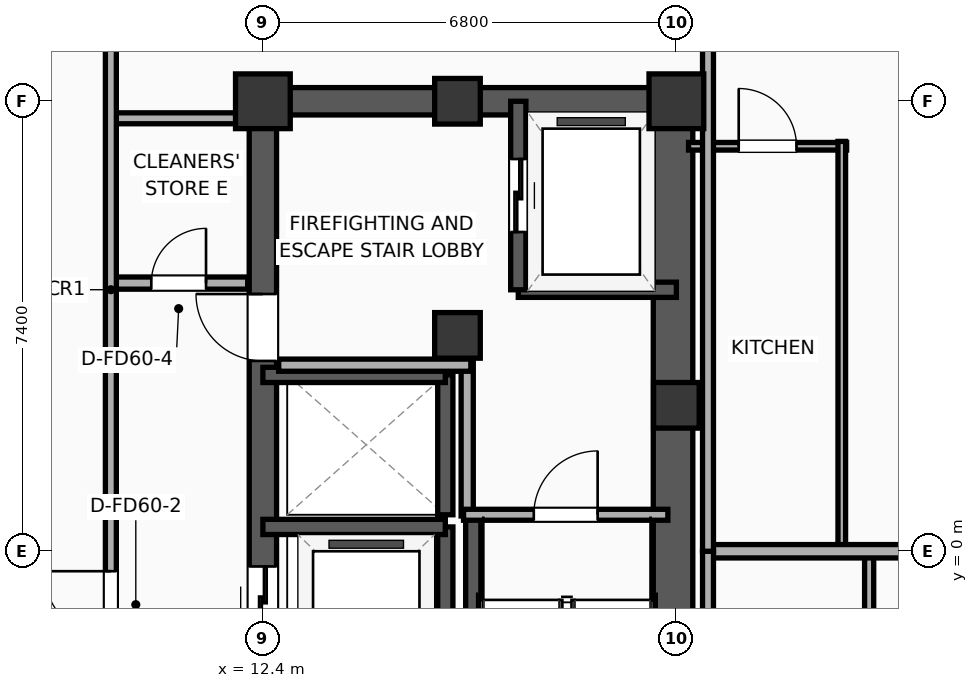
"""IFC4 building model, lengths in metres.
Left out: names, types, materials, properties, quantities, classifications, styles, units other than length and angle.
Written with IfcOpenShell. Run it as: python <this file> out.ifc"""

import sys

from ifc_helpers import new_model, si_unit, direction, frame, frame_2d, origin, origin_2d, place, context, subcontext, project, spatial, rectangle, extrude, element, fill, save


model = new_model("IFC4")
c1 = context("Model", 3, precision=1e-05, world=origin(), true_north=direction((0.0, 1.0)))
c2 = subcontext(c1, "Body", "Model", "MODEL_VIEW")
j1 = project(units=[si_unit("LENGTHUNIT", "METRE"), si_unit("PLANEANGLEUNIT", "RADIAN")], contexts=[c1])
p1 = place(None, origin())
s1 = spatial("IfcSite", under=j1, at=p1, CompositionType="ELEMENT")
p2 = place(p1, origin())
s2 = spatial("IfcBuilding", under=s1, at=p2, CompositionType="ELEMENT")
p3 = place(p2, frame((0.0, 0.0, 187.2)))
s3 = spatial("IfcBuildingStorey", under=s2, at=p3, CompositionType="ELEMENT", Elevation=187.2)
p4 = place(p3, frame((15.6, 3.55, 0.0), z_axis=(0.0, 0.0, 1.0), x_axis=(1.0, 0.0, 0.0)))
e1 = element("IfcColumn", 1, at=p4, inside=s3, PredefinedType="COLUMN", context=c2, shape_type="SweptSolid", body=[
    extrude(rectangle(XDim=0.75, YDim=0.75, at=origin_2d()), origin(), (0.0, 0.0, 1.0), 3.9),
])
p5 = place(p3, frame((12.4, 7.4, 0.0), z_axis=(0.0, 0.0, 1.0), x_axis=(1.0, 0.0, 0.0)))
e2 = element("IfcColumn", 2, at=p5, inside=s3, PredefinedType="COLUMN", context=c2, shape_type="SweptSolid", body=[
    extrude(rectangle(XDim=0.9, YDim=0.9, at=origin_2d()), origin(), (0.0, 0.0, 1.0), 3.9),
])
for number, where, z_axis, x_axis in (
    (3, (15.6, 7.4, 0.0), (0.0, 0.0, 1.0), (1.0, 0.0, 0.0)),
    (4, (19.2, 2.4, 0.0), (0.0, 0.0, 1.0), (1.0, 0.0, 0.0)),
):
    element("IfcColumn", number, at=place(p3, frame(where, z_axis=z_axis, x_axis=x_axis)), inside=s3, PredefinedType="COLUMN", context=c2, shape_type="SweptSolid", body=[
        extrude(rectangle(XDim=0.75, YDim=0.75, at=origin_2d()), origin(), (0.0, 0.0, 1.0), 3.9),
    ])
p6 = place(p3, frame((19.2, 7.4, 0.0), z_axis=(0.0, 0.0, 1.0), x_axis=(1.0, 0.0, 0.0)))
e5 = element("IfcColumn", 5, at=p6, inside=s3, PredefinedType="COLUMN", context=c2, shape_type="SweptSolid", body=[
    extrude(rectangle(XDim=0.9, YDim=0.9, at=origin_2d()), origin(), (0.0, 0.0, 1.0), 3.9),
])
p7 = place(p3, frame((12.175, 7.4, 0.0), z_axis=(0.0, 0.0, 1.0), x_axis=(1.0, 0.0, 0.0)))
e6 = element("IfcWall", 6, at=p7, inside=s3, PredefinedType="SHEAR", context=c2, shape_type="SweptSolid", body=[
    extrude(rectangle(XDim=7.25, YDim=0.45, at=frame_2d((3.625, 0.0))), origin(), (0.0, 0.0, 1.0), 3.65),
])
p8 = place(p3, frame((12.4, -7.4, 0.0), z_axis=(0.0, 0.0, 1.0), x_axis=(0.0, 1.0, 0.0)))
e7 = element("IfcWall", 7, at=p8, inside=s3, PredefinedType="SHEAR", context=c2, shape_type="SweptSolid", body=[
    extrude(rectangle(XDim=14.8, YDim=0.45, at=frame_2d((7.4, 0.0))), origin(), (0.0, 0.0, 1.0), 3.65),
])
p9 = place(p8, frame((3.45, 0.0, 0.0)))
e8 = element("IfcOpeningElement", 8, at=p9, cuts=e7, PredefinedType="OPENING", context=c2, shape_type="SweptSolid", body=[
    extrude(rectangle(XDim=1.1, YDim=2.05, at=frame_2d((0.55, 1.025))), frame((0.0, 0.235, 0.0), z_axis=(0.0, -1.0, 0.0), x_axis=(1.0, 0.0, 0.0)), (0.0, 0.0, 1.0), 0.47),
])
p10 = place(p8, frame((6.05, 0.0, 0.0)))
e9 = element("IfcOpeningElement", 9, at=p10, cuts=e7, PredefinedType="OPENING", context=c2, shape_type="SweptSolid", body=[
    extrude(rectangle(XDim=1.1, YDim=2.05, at=frame_2d((0.55, 1.025))), frame((0.0, 0.235, 0.0), z_axis=(0.0, -1.0, 0.0), x_axis=(1.0, 0.0, 0.0)), (0.0, 0.0, 1.0), 0.47),
])
p11 = place(p8, frame((10.53, 0.0, 0.0)))
e10 = element("IfcOpeningElement", 10, at=p11, cuts=e7, PredefinedType="OPENING", context=c2, shape_type="SweptSolid", body=[
    extrude(rectangle(XDim=1.1, YDim=2.05, at=frame_2d((0.55, 1.025))), frame((0.0, 0.235, 0.0), z_axis=(0.0, -1.0, 0.0), x_axis=(1.0, 0.0, 0.0)), (0.0, 0.0, 1.0), 0.47),
])
p12 = place(p8, frame((1.0, 0.0, 0.0)))
e11 = element("IfcOpeningElement", 11, at=p12, cuts=e7, PredefinedType="OPENING", context=c2, shape_type="SweptSolid", body=[
    extrude(rectangle(XDim=0.9, YDim=2.05, at=frame_2d((0.45, 1.025))), frame((0.0, 0.235, 0.0), z_axis=(0.0, -1.0, 0.0), x_axis=(1.0, 0.0, 0.0)), (0.0, 0.0, 1.0), 0.47),
])
p13 = place(p3, frame((19.145, -7.4, 0.0), z_axis=(0.0, 0.0, 1.0), x_axis=(0.0, 1.0, 0.0)))
e12 = element("IfcWall", 12, at=p13, inside=s3, PredefinedType="SHEAR", context=c2, shape_type="SweptSolid", body=[
    extrude(rectangle(XDim=14.8, YDim=0.65, at=frame_2d((7.4, 0.0))), origin(), (0.0, 0.0, 1.0), 3.65),
])
p14 = place(p3, frame((15.86, -7.085, 0.0), z_axis=(0.0, 0.0, 1.0), x_axis=(0.0, 1.0, 0.0)))
e13 = element("IfcWall", 13, at=p14, inside=s3, PredefinedType="SOLIDWALL", context=c2, shape_type="SweptSolid", body=[
    extrude(rectangle(XDim=7.685, YDim=0.25, at=frame_2d((3.843, 0.0))), origin(), (0.0, 0.0, 1.0), 3.65),
])
p15 = place(p3, frame((16.6, 4.3, 0.0), z_axis=(0.0, 0.0, 1.0), x_axis=(1.0, 0.0, 0.0)))
e14 = element("IfcWall", 14, at=p15, inside=s3, PredefinedType="SOLIDWALL", context=c2, shape_type="SweptSolid", body=[
    extrude(rectangle(XDim=2.6, YDim=0.25, at=frame_2d((1.3, 0.0))), origin(), (0.0, 0.0, 1.0), 3.65),
])
p16 = place(p3, frame((16.6, 7.4, 0.0), z_axis=(0.0, 0.0, 1.0), x_axis=(0.0, -1.0, 0.0)))
e15 = element("IfcWall", 15, at=p16, inside=s3, PredefinedType="SOLIDWALL", context=c2, shape_type="SweptSolid", body=[
    extrude(rectangle(XDim=3.1, YDim=0.25, at=frame_2d((1.55, 0.0))), origin(), (0.0, 0.0, 1.0), 3.65),
])
p17 = place(p16, frame((0.95, 0.0, 0.0)))
e16 = element("IfcOpeningElement", 16, at=p17, cuts=e15, PredefinedType="OPENING", context=c2, shape_type="SweptSolid", body=[
    extrude(rectangle(XDim=1.2, YDim=2.05, at=frame_2d((0.6, 1.025))), frame((0.0, 0.135, 0.0), z_axis=(0.0, -1.0, 0.0), x_axis=(1.0, 0.0, 0.0)), (0.0, 0.0, 1.0), 0.27),
])
p18 = place(p3, frame((15.4, -2.0, 0.0), z_axis=(0.0, 0.0, 1.0), x_axis=(0.0, 1.0, 0.0)))
e17 = element("IfcWall", 17, at=p18, inside=s3, PredefinedType="SOLIDWALL", context=c2, shape_type="SweptSolid", body=[
    extrude(rectangle(XDim=2.4, YDim=0.25, at=frame_2d((1.2, 0.0))), origin(), (0.0, 0.0, 1.0), 3.65),
])
p19 = place(p3, frame((15.4, 0.4, 0.0), z_axis=(0.0, 0.0, 1.0), x_axis=(-1.0, 0.0, 0.0)))
e18 = element("IfcWall", 18, at=p19, inside=s3, PredefinedType="SOLIDWALL", context=c2, shape_type="SweptSolid", body=[
    extrude(rectangle(XDim=3.0, YDim=0.25, at=frame_2d((1.5, 0.0))), origin(), (0.0, 0.0, 1.0), 3.65),
])
p20 = place(p3, frame((15.4, 0.6, 0.0), z_axis=(0.0, 0.0, 1.0), x_axis=(0.0, 1.0, 0.0)))
e19 = element("IfcWall", 19, at=p20, inside=s3, PredefinedType="SOLIDWALL", context=c2, shape_type="SweptSolid", body=[
    extrude(rectangle(XDim=2.3, YDim=0.25, at=frame_2d((1.15, 0.0))), origin(), (0.0, 0.0, 1.0), 3.65),
])
p21 = place(p3, frame((15.4, 2.9, 0.0), z_axis=(0.0, 0.0, 1.0), x_axis=(-1.0, 0.0, 0.0)))
e20 = element("IfcWall", 20, at=p21, inside=s3, PredefinedType="SOLIDWALL", context=c2, shape_type="SweptSolid", body=[
    extrude(rectangle(XDim=3.0, YDim=0.25, at=frame_2d((1.5, 0.0))), origin(), (0.0, 0.0, 1.0), 3.65),
])
p22 = place(p3, frame((15.76, 0.58, 0.0), z_axis=(0.0, 0.0, 1.0), x_axis=(0.0, 1.0, 0.0)))
e21 = element("IfcWall", 21, at=p22, inside=s3, PredefinedType="PARTITIONING", context=c2, shape_type="SweptSolid", body=[
    extrude(rectangle(XDim=2.52, YDim=0.2, at=frame_2d((1.26, 0.0))), origin(), (0.0, 0.0, 1.0), 3.65),
])
p23 = place(p3, frame((12.66, 3.06, 0.0), z_axis=(0.0, 0.0, 1.0), x_axis=(1.0, 0.0, 0.0)))
e22 = element("IfcWall", 22, at=p23, inside=s3, PredefinedType="PARTITIONING", context=c2, shape_type="SweptSolid", body=[
    extrude(rectangle(XDim=3.16, YDim=0.2, at=frame_2d((1.58, 0.0))), origin(), (0.0, 0.0, 1.0), 3.65),
])
p24 = place(p3, frame((15.7, 0.6, 0.0), z_axis=(0.0, 0.0, 1.0), x_axis=(1.0, 0.0, 0.0)))
e23 = element("IfcWall", 23, at=p24, inside=s3, PredefinedType="PARTITIONING", context=c2, shape_type="SweptSolid", body=[
    extrude(rectangle(XDim=3.36, YDim=0.18, at=frame_2d((1.68, 0.0))), origin(), (0.0, 0.0, 1.0), 3.65),
])
p25 = place(p24, frame((1.155, 0.0, 0.0)))
e24 = element("IfcOpeningElement", 24, at=p25, cuts=e23, PredefinedType="OPENING", context=c2, shape_type="SweptSolid", body=[
    extrude(rectangle(XDim=1.05, YDim=2.05, at=frame_2d((0.525, 1.025))), frame((0.0, 0.1, 0.0), z_axis=(0.0, -1.0, 0.0), x_axis=(1.0, 0.0, 0.0)), (0.0, 0.0, 1.0), 0.2),
])
p26 = place(p3, frame((9.88, 4.41, 0.0), z_axis=(0.0, 0.0, 1.0), x_axis=(1.0, 0.0, 0.0)))
e25 = element("IfcWall", 25, at=p26, inside=s3, PredefinedType="PARTITIONING", context=c2, shape_type="SweptSolid", body=[
    extrude(rectangle(XDim=2.27, YDim=0.2, at=frame_2d((1.135, 0.0))), origin(), (0.0, 0.0, 1.0), 3.65),
])
p27 = place(p26, frame((0.685, 0.0, 0.0)))
e26 = element("IfcOpeningElement", 26, at=p27, cuts=e25, PredefinedType="OPENING", context=c2, shape_type="SweptSolid", body=[
    extrude(rectangle(XDim=0.9, YDim=2.05, at=frame_2d((0.45, 1.025))), frame((0.0, 0.11, 0.0), z_axis=(0.0, -1.0, 0.0), x_axis=(1.0, 0.0, 0.0)), (0.0, 0.0, 1.0), 0.22),
])
p28 = place(p3, frame((9.88, 7.12, 0.0), z_axis=(0.0, 0.0, 1.0), x_axis=(1.0, 0.0, 0.0)))
e27 = element("IfcWall", 27, at=p28, inside=s3, PredefinedType="PARTITIONING", context=c2, shape_type="SweptSolid", body=[
    extrude(rectangle(XDim=2.27, YDim=0.18, at=frame_2d((1.135, 0.0))), origin(), (0.0, 0.0, 1.0), 3.65),
])
p29 = place(p3, frame((9.9, -8.78, 0.0), z_axis=(0.0, 0.0, 1.0), x_axis=(0.0, 1.0, 0.0)))
e28 = element("IfcWall", 28, at=p29, inside=s3, PredefinedType="PARTITIONING", context=c2, shape_type="SweptSolid", body=[
    extrude(rectangle(XDim=17.56, YDim=0.18, at=frame_2d((8.78, 0.0))), origin(), (0.0, 0.0, 1.0), 3.65),
])
p30 = place(p29, frame((7.352, 0.0, 0.0)))
e29 = element("IfcOpeningElement", 29, at=p30, cuts=e28, PredefinedType="OPENING", context=c2, shape_type="SweptSolid", body=[
    extrude(rectangle(XDim=1.1, YDim=2.05, at=frame_2d((0.55, 1.025))), frame((0.0, 0.1, 0.0), z_axis=(0.0, -1.0, 0.0), x_axis=(1.0, 0.0, 0.0)), (0.0, 0.0, 1.0), 0.2),
])
p31 = place(p3, frame((22.37, -6.74, 0.0), z_axis=(0.0, 0.0, 1.0), x_axis=(0.0, 1.0, 0.0)))
e30 = element("IfcWall", 30, at=p31, inside=s3, PredefinedType="PLUMBINGWALL", context=c2, shape_type="SweptSolid", body=[
    extrude(rectangle(XDim=6.72, YDim=0.15, at=frame_2d((3.36, 0.0))), origin(), (0.0, 0.0, 1.0), 3.65),
])
p32 = place(p3, frame((19.4, 6.66, 0.0), z_axis=(0.0, 0.0, 1.0), x_axis=(1.0, 0.0, 0.0)))
e31 = element("IfcWall", 31, at=p32, inside=s3, PredefinedType="PARTITIONING", context=c2, shape_type="SweptSolid", body=[
    extrude(rectangle(XDim=2.6, YDim=0.125, at=frame_2d((1.3, 0.0))), origin(), (0.0, 0.0, 1.0), 3.65),
])
p33 = place(p32, frame((0.825, 0.0, 0.0)))
e32 = element("IfcOpeningElement", 32, at=p33, cuts=e31, PredefinedType="OPENING", context=c2, shape_type="SweptSolid", body=[
    extrude(rectangle(XDim=0.95, YDim=2.05, at=frame_2d((0.475, 1.025))), frame((0.0, 0.073, 0.0), z_axis=(0.0, -1.0, 0.0), x_axis=(1.0, 0.0, 0.0)), (0.0, 0.0, 1.0), 0.145),
])
p34 = place(p3, frame((21.92, 0.02, 0.0), z_axis=(0.0, 0.0, 1.0), x_axis=(0.0, 1.0, 0.0)))
e33 = element("IfcWall", 33, at=p34, inside=s3, PredefinedType="PARTITIONING", context=c2, shape_type="SweptSolid", body=[
    extrude(rectangle(XDim=6.72, YDim=0.125, at=frame_2d((3.36, 0.0))), origin(), (0.0, 0.0, 1.0), 3.65),
])
p35 = place(p3, frame((19.72, 0.0, 0.0), z_axis=(0.0, 0.0, 1.0), x_axis=(1.0, 0.0, 0.0)))
e34 = element("IfcWall", 34, at=p35, inside=s3, PredefinedType="PARTITIONING", context=c2, shape_type="SweptSolid", body=[
    extrude(rectangle(XDim=6.81, YDim=0.22, at=frame_2d((3.405, 0.0))), origin(), (0.0, 0.0, 1.0), 3.65),
])
p36 = place(p3, frame((19.72, -18.532, 0.0), z_axis=(0.0, 0.0, 1.0), x_axis=(0.0, 1.0, 0.0)))
e35 = element("IfcWall", 35, at=p36, inside=s3, PredefinedType="PARTITIONING", context=c2, shape_type="SweptSolid", body=[
    extrude(rectangle(XDim=18.532, YDim=0.18, at=frame_2d((9.266, 0.0))), origin(), (0.0, 0.0, 1.0), 3.65),
])
p37 = place(p36, frame((8.653, 0.0, 0.0)))
e36 = element("IfcOpeningElement", 36, at=p37, cuts=e35, PredefinedType="OPENING", context=c2, shape_type="SweptSolid", body=[
    extrude(rectangle(XDim=0.9, YDim=2.05, at=frame_2d((0.45, 1.025))), frame((0.0, 0.1, 0.0), z_axis=(0.0, -1.0, 0.0), x_axis=(1.0, 0.0, 0.0)), (0.0, 0.0, 1.0), 0.2),
])
p38 = place(p3, frame((19.72, 0.0, 0.0), z_axis=(0.0, 0.0, 1.0), x_axis=(0.0, 1.0, 0.0)))
e37 = element("IfcWall", 37, at=p38, inside=s3, PredefinedType="PARTITIONING", context=c2, shape_type="SweptSolid", body=[
    extrude(rectangle(XDim=22.15, YDim=0.18, at=frame_2d((11.075, 0.0))), origin(), (0.0, 0.0, 1.0), 3.04),
])
p39 = place(p38, frame((8.979, 0.0, 0.0)))
e38 = element("IfcOpeningElement", 38, at=p39, cuts=e37, PredefinedType="OPENING", context=c2, shape_type="SweptSolid", body=[
    extrude(rectangle(XDim=0.9, YDim=2.05, at=frame_2d((0.45, 1.025))), frame((0.0, 0.1, 0.0), z_axis=(0.0, -1.0, 0.0), x_axis=(1.0, 0.0, 0.0)), (0.0, 0.0, 1.0), 0.2),
])
p40 = place(p17, origin())
e39 = element("IfcDoor", 39, at=p40, inside=s3, OperationType="SLIDING_TO_LEFT", PredefinedType="DOOR", context=c2, shape_type="SweptSolid", body=[
    extrude(rectangle(XDim=1.2, YDim=2.05, at=frame_2d((0.6, 1.025))), frame((0.0, 0.025, 0.0), z_axis=(0.0, -1.0, 0.0), x_axis=(1.0, 0.0, 0.0)), (0.0, 0.0, 1.0), 0.05),
])
fill(e16, e39)
p41 = place(p10, origin())
e40 = element("IfcDoor", 40, at=p41, inside=s3, OperationType="SLIDING_TO_LEFT", PredefinedType="DOOR", context=c2, shape_type="SweptSolid", body=[
    extrude(rectangle(XDim=1.1, YDim=2.05, at=frame_2d((0.55, 1.025))), frame((0.0, 0.025, 0.0), z_axis=(0.0, -1.0, 0.0), x_axis=(1.0, 0.0, 0.0)), (0.0, 0.0, 1.0), 0.05),
])
fill(e9, e40)
p42 = place(p25, origin())
e41 = element("IfcDoor", 41, at=p42, inside=s3, OperationType="SINGLE_SWING_RIGHT", PredefinedType="DOOR", context=c2, shape_type="SweptSolid", body=[
    extrude(rectangle(XDim=1.05, YDim=2.05, at=frame_2d((0.525, 1.025))), frame((0.0, 0.025, 0.0), z_axis=(0.0, -1.0, 0.0), x_axis=(1.0, 0.0, 0.0)), (0.0, 0.0, 1.0), 0.05),
])
fill(e24, e41)
p43 = place(p27, origin())
e42 = element("IfcDoor", 42, at=p43, inside=s3, OperationType="SINGLE_SWING_RIGHT", PredefinedType="DOOR", context=c2, shape_type="SweptSolid", body=[
    extrude(rectangle(XDim=0.9, YDim=2.05, at=frame_2d((0.45, 1.025))), frame((0.0, 0.025, 0.0), z_axis=(0.0, -1.0, 0.0), x_axis=(1.0, 0.0, 0.0)), (0.0, 0.0, 1.0), 0.05),
])
fill(e26, e42)
p44 = place(p30, origin())
e43 = element("IfcDoor", 43, at=p44, inside=s3, OperationType="SINGLE_SWING_RIGHT", PredefinedType="DOOR", context=c2, shape_type="SweptSolid", body=[
    extrude(rectangle(XDim=1.1, YDim=2.05, at=frame_2d((0.55, 1.025))), frame((0.0, 0.025, 0.0), z_axis=(0.0, -1.0, 0.0), x_axis=(1.0, 0.0, 0.0)), (0.0, 0.0, 1.0), 0.05),
])
fill(e29, e43)
p45 = place(p33, origin())
e44 = element("IfcDoor", 44, at=p45, inside=s3, OperationType="SINGLE_SWING_LEFT", PredefinedType="DOOR", context=c2, shape_type="SweptSolid", body=[
    extrude(rectangle(XDim=0.95, YDim=2.05, at=frame_2d((0.475, 1.025))), frame((0.0, 0.025, 0.0), z_axis=(0.0, -1.0, 0.0), x_axis=(1.0, 0.0, 0.0)), (0.0, 0.0, 1.0), 0.05),
])
fill(e32, e44)
p46 = place(p11, origin())
e45 = element("IfcDoor", 45, at=p46, inside=s3, OperationType="SINGLE_SWING_RIGHT", PredefinedType="DOOR", context=c2, shape_type="SweptSolid", body=[
    extrude(rectangle(XDim=1.1, YDim=2.05, at=frame_2d((0.55, 1.025))), frame((0.0, 0.025, 0.0), z_axis=(0.0, -1.0, 0.0), x_axis=(1.0, 0.0, 0.0)), (0.0, 0.0, 1.0), 0.05),
])
fill(e10, e45)
save(model, sys.argv[1])
